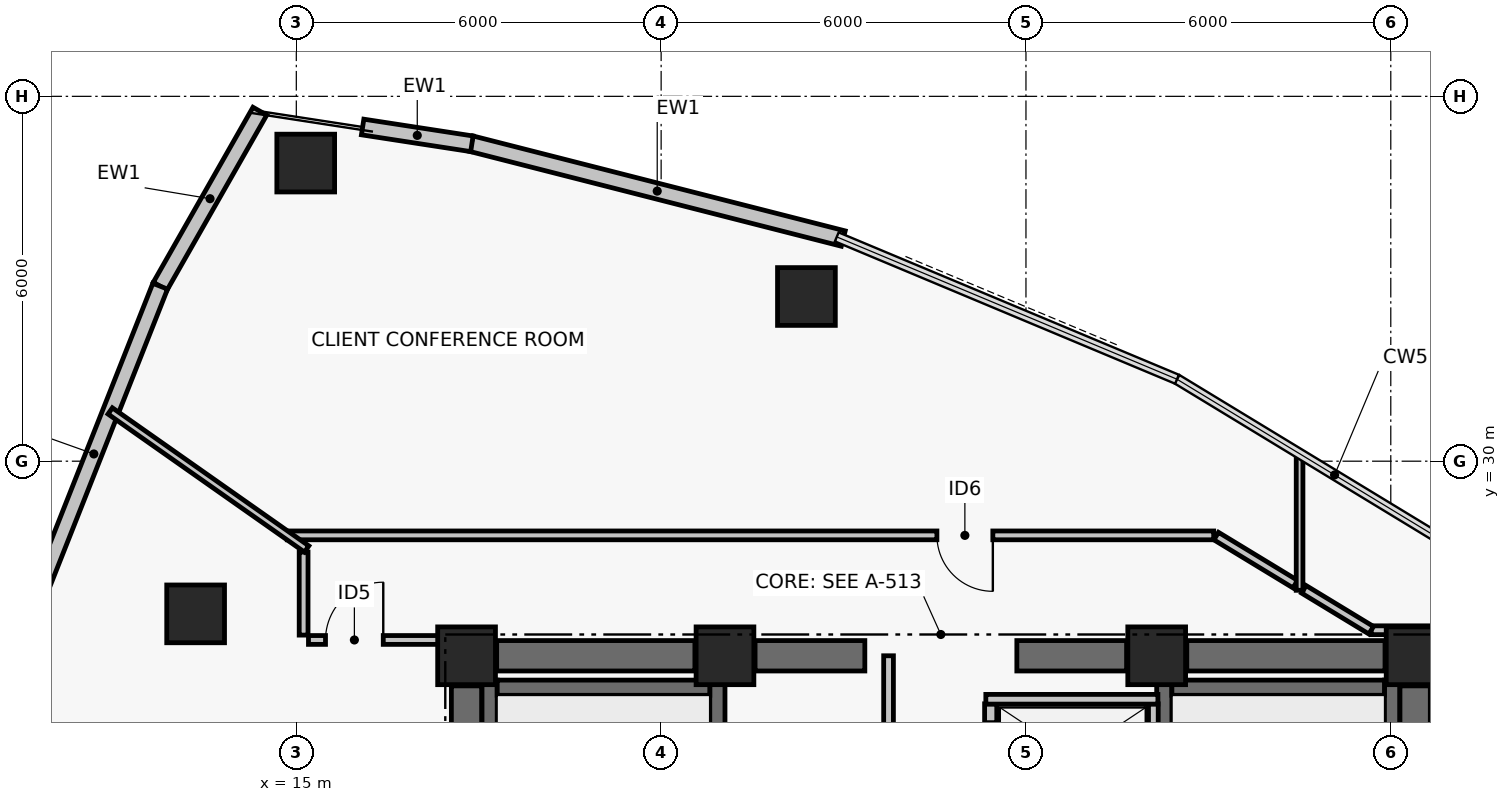
"""IFC4 building model, lengths in metres.
Left out: names, types, materials, properties, quantities, classifications, styles, units other than length and angle.
Written with IfcOpenShell. Run it as: python <this file> out.ifc"""

import sys

from ifc_helpers import new_model, si_unit, direction, frame, frame_2d, origin, origin_2d, place, context, subcontext, project, spatial, rectangle, hollow_rectangle, extrude, element, fill, save


model = new_model("IFC4")
c1 = context("Model", 3, precision=1e-05, world=origin(), true_north=direction((0.0, 1.0)))
c2 = subcontext(c1, "Body", "Model", "MODEL_VIEW")
j1 = project(units=[si_unit("LENGTHUNIT", "METRE"), si_unit("PLANEANGLEUNIT", "RADIAN")], contexts=[c1])
p1 = place(None, origin())
s1 = spatial("IfcSite", under=j1, at=p1, CompositionType="ELEMENT")
p2 = place(p1, origin())
s2 = spatial("IfcBuilding", under=s1, at=p2, CompositionType="ELEMENT")
p3 = place(p2, frame((0.0, 0.0, 176.64)))
s3 = spatial("IfcBuildingStorey", under=s2, at=p3, CompositionType="ELEMENT", Elevation=176.64)
for number, where, z_axis, x_axis in (
    (1, (17.8, 26.8, 0.0), (0.0, 0.0, 1.0), (1.0, 0.0, 0.0)),
    (2, (22.05, 26.8, 0.0), (0.0, 0.0, 1.0), (1.0, 0.0, 0.0)),
    (3, (29.15, 26.8, 0.0), (0.0, 0.0, 1.0), (1.0, 0.0, 0.0)),
    (4, (33.4, 26.8, 0.0), (0.0, 0.0, 1.0), (1.0, 0.0, 0.0)),
):
    element("IfcColumn", number, at=place(p3, frame(where, z_axis=z_axis, x_axis=x_axis)), inside=s3, PredefinedType="COLUMN", context=c2, shape_type="SweptSolid", body=[
        extrude(rectangle(XDim=0.95, YDim=0.95, at=origin_2d()), origin(), (0.0, 0.0, 1.0), 3.72),
    ])
p4 = place(p3, frame((18.295, 26.8, 0.0), z_axis=(0.0, 0.0, 1.0), x_axis=(1.0, 0.0, 0.0)))
e5 = element("IfcWall", 5, at=p4, inside=s3, PredefinedType="SHEAR", context=c2, shape_type="SweptSolid", body=[
    extrude(rectangle(XDim=3.26, YDim=0.5, at=frame_2d((1.63, 0.0))), origin(), (0.0, 0.0, 1.0), 3.5),
])
p5 = place(p3, frame((22.545, 26.8, 0.0), z_axis=(0.0, 0.0, 1.0), x_axis=(1.0, 0.0, 0.0)))
e6 = element("IfcWall", 6, at=p5, inside=s3, PredefinedType="SHEAR", context=c2, shape_type="SweptSolid", body=[
    extrude(rectangle(XDim=1.805, YDim=0.5, at=frame_2d((0.903, 0.0))), origin(), (0.0, 0.0, 1.0), 3.5),
])
p6 = place(p3, frame((26.85, 26.8, 0.0), z_axis=(0.0, 0.0, 1.0), x_axis=(1.0, 0.0, 0.0)))
e7 = element("IfcWall", 7, at=p6, inside=s3, PredefinedType="SHEAR", context=c2, shape_type="SweptSolid", body=[
    extrude(rectangle(XDim=1.805, YDim=0.5, at=frame_2d((0.902, 0.0))), origin(), (0.0, 0.0, 1.0), 3.5),
])
p7 = place(p3, frame((29.645, 26.8, 0.0), z_axis=(0.0, 0.0, 1.0), x_axis=(1.0, 0.0, 0.0)))
e8 = element("IfcWall", 8, at=p7, inside=s3, PredefinedType="SHEAR", context=c2, shape_type="SweptSolid", body=[
    extrude(rectangle(XDim=3.26, YDim=0.5, at=frame_2d((1.63, 0.0))), origin(), (0.0, 0.0, 1.0), 3.5),
])
for number, where, z_axis, x_axis in (
    (9, (17.8, 17.695, 0.0), (0.0, 0.0, 1.0), (0.0, 1.0, 0.0)),
    (10, (33.4, 17.695, 0.0), (0.0, 0.0, 1.0), (0.0, 1.0, 0.0)),
):
    element("IfcWall", number, at=place(p3, frame(where, z_axis=z_axis, x_axis=x_axis)), inside=s3, PredefinedType="SHEAR", context=c2, shape_type="SweptSolid", body=[
        extrude(rectangle(XDim=8.61, YDim=0.5, at=frame_2d((4.305, 0.0))), origin(), (0.0, 0.0, 1.0), 3.5),
    ])
p8 = place(p3, frame((18.179, 17.6, 0.0), z_axis=(0.0, 0.0, 1.0), x_axis=(0.0, 1.0, 0.0)))
e11 = element("IfcWall", 11, at=p8, inside=s3, PredefinedType="SHEAR", context=c2, shape_type="SweptSolid", body=[
    extrude(rectangle(XDim=8.8, YDim=0.25, at=frame_2d((4.4, 0.0))), origin(), (0.0, 0.0, 1.0), 3.5),
])
p9 = place(p3, frame((21.925, 17.6, 0.0), z_axis=(0.0, 0.0, 1.0), x_axis=(0.0, 1.0, 0.0)))
e12 = element("IfcWall", 12, at=p9, inside=s3, PredefinedType="SHEAR", context=c2, shape_type="SweptSolid", body=[
    extrude(rectangle(XDim=8.8, YDim=0.25, at=frame_2d((4.4, 0.0))), origin(), (0.0, 0.0, 1.0), 3.5),
])
p10 = place(p9, frame((0.35, 0.0, 0.0)))
e13 = element("IfcOpeningElement", 13, at=p10, cuts=e12, PredefinedType="OPENING", context=c2, shape_type="SweptSolid", body=[
    extrude(rectangle(XDim=1.05, YDim=2.08, at=frame_2d((0.525, 1.04))), frame((0.0, 0.135, 0.0), z_axis=(0.0, -1.0, 0.0), x_axis=(1.0, 0.0, 0.0)), (0.0, 0.0, 1.0), 0.27),
])
p11 = place(p3, frame((18.304, 26.275, 0.0), z_axis=(0.0, 0.0, 1.0), x_axis=(1.0, 0.0, 0.0)))
e14 = element("IfcWall", 14, at=p11, inside=s3, PredefinedType="SHEAR", context=c2, shape_type="SweptSolid", body=[
    extrude(rectangle(XDim=3.496, YDim=0.25, at=frame_2d((1.748, 0.0))), origin(), (0.0, 0.0, 1.0), 3.5),
])
p12 = place(p3, frame((29.275, 17.6, 0.0), z_axis=(0.0, 0.0, 1.0), x_axis=(0.0, 1.0, 0.0)))
e15 = element("IfcWall", 15, at=p12, inside=s3, PredefinedType="SHEAR", context=c2, shape_type="SweptSolid", body=[
    extrude(rectangle(XDim=8.8, YDim=0.25, at=frame_2d((4.4, 0.0))), origin(), (0.0, 0.0, 1.0), 3.5),
])
p13 = place(p12, frame((0.35, 0.0, 0.0)))
e16 = element("IfcOpeningElement", 16, at=p13, cuts=e15, PredefinedType="OPENING", context=c2, shape_type="SweptSolid", body=[
    extrude(rectangle(XDim=1.05, YDim=2.08, at=frame_2d((0.525, 1.04))), frame((0.0, 0.135, 0.0), z_axis=(0.0, -1.0, 0.0), x_axis=(1.0, 0.0, 0.0)), (0.0, 0.0, 1.0), 0.27),
])
p14 = place(p3, frame((33.021, 17.6, 0.0), z_axis=(0.0, 0.0, 1.0), x_axis=(0.0, 1.0, 0.0)))
e17 = element("IfcWall", 17, at=p14, inside=s3, PredefinedType="SHEAR", context=c2, shape_type="SweptSolid", body=[
    extrude(rectangle(XDim=8.8, YDim=0.25, at=frame_2d((4.4, 0.0))), origin(), (0.0, 0.0, 1.0), 3.5),
])
p15 = place(p3, frame((29.4, 26.275, 0.0), z_axis=(0.0, 0.0, 1.0), x_axis=(1.0, 0.0, 0.0)))
e18 = element("IfcWall", 18, at=p15, inside=s3, PredefinedType="SHEAR", context=c2, shape_type="SweptSolid", body=[
    extrude(rectangle(XDim=3.496, YDim=0.25, at=frame_2d((1.748, 0.0))), origin(), (0.0, 0.0, 1.0), 3.5),
])
for number, where, z_axis, x_axis in (
    (19, (23.389, 32.708, 0.0), (0.0, 0.0, 1.0), (1.0, 0.0, 0.0)),
    (20, (15.155, 34.903, 0.0), (0.0, 0.0, 1.0), (1.0, 0.0, 0.0)),
    (21, (13.344, 27.489, 0.0), (0.0, 0.0, 1.0), (1.0, 0.0, 0.0)),
):
    element("IfcColumn", number, at=place(p3, frame(where, z_axis=z_axis, x_axis=x_axis)), inside=s3, PredefinedType="COLUMN", context=c2, shape_type="SweptSolid", body=[
        extrude(hollow_rectangle(XDim=0.95, YDim=0.95, WallThickness=0.04, at=origin_2d()), origin(), (0.0, 0.0, 1.0), 3.72),
    ])
p16 = place(p3, frame((17.876, 35.222, 0.0), z_axis=(0.0, 0.0, 1.0), x_axis=(0.968976240439, -0.247153890246, 0.0)))
e22 = element("IfcWall", 22, at=p16, inside=s3, PredefinedType="PARTITIONING", context=c2, shape_type="SweptSolid", body=[
    extrude(rectangle(XDim=6.315, YDim=0.26, at=frame_2d((3.157, 0.0))), origin(), (0.0, 0.0, 1.0), 3.5),
])
p17 = place(p3, frame((16.091, 35.496, 0.0), z_axis=(0.0, 0.0, 1.0), x_axis=(0.988377906791, -0.15201681936, 0.0)))
e23 = element("IfcWall", 23, at=p17, inside=s3, PredefinedType="PARTITIONING", context=c2, shape_type="SweptSolid", body=[
    extrude(rectangle(XDim=1.818, YDim=0.26, at=frame_2d((0.909, 0.0))), origin(), (0.0, 0.0, 1.0), 3.5),
])
p18 = place(p3, frame((12.761, 32.878, 0.0), z_axis=(0.0, 0.0, 1.0), x_axis=(0.494884228667, 0.86895891745, 0.0)))
e24 = element("IfcWall", 24, at=p18, inside=s3, PredefinedType="PARTITIONING", context=c2, shape_type="SweptSolid", body=[
    extrude(rectangle(XDim=3.312, YDim=0.26, at=frame_2d((1.656, 0.0))), origin(), (0.0, 0.0, 1.0), 3.5),
])
p19 = place(p3, frame((10.579, 27.36, 0.0), z_axis=(0.0, 0.0, 1.0), x_axis=(0.367819433119, 0.929897233365, 0.0)))
e25 = element("IfcWall", 25, at=p19, inside=s3, PredefinedType="PARTITIONING", context=c2, shape_type="SweptSolid", body=[
    extrude(rectangle(XDim=5.933, YDim=0.26, at=frame_2d((2.967, 0.0))), origin(), (0.0, 0.0, 1.0), 3.5),
])
p20 = place(p3, frame((26.42, 24.29, 0.0), z_axis=(0.0, 0.0, 1.0), x_axis=(0.0, 1.0, 0.0)))
e26 = element("IfcWall", 26, at=p20, inside=s3, PredefinedType="PARTITIONING", context=c2, shape_type="SweptSolid", body=[
    extrude(rectangle(XDim=1.72, YDim=0.2, at=frame_2d((0.86, 0.0))), origin(), (0.0, 0.0, 1.0), 3.5),
])
p21 = place(p20, frame((0.31, 0.0, 0.0)))
e27 = element("IfcOpeningElement", 27, at=p21, cuts=e26, PredefinedType="OPENING", context=c2, shape_type="SweptSolid", body=[
    extrude(rectangle(XDim=1.1, YDim=2.08, at=frame_2d((0.55, 1.04))), frame((0.0, 0.11, 0.0), z_axis=(0.0, -1.0, 0.0), x_axis=(1.0, 0.0, 0.0)), (0.0, 0.0, 1.0), 0.22),
])
p22 = place(p3, frame((29.095, 20.56, 0.0), z_axis=(0.0, 0.0, 1.0), x_axis=(0.0, 1.0, 0.0)))
e28 = element("IfcWall", 28, at=p22, inside=s3, PredefinedType="PARTITIONING", context=c2, shape_type="SweptSolid", body=[
    extrude(rectangle(XDim=5.45, YDim=0.16, at=frame_2d((2.725, 0.0))), origin(), (0.0, 0.0, 1.0), 3.5),
])
p23 = place(p3, frame((26.34, 26.085, 0.0), z_axis=(0.0, 0.0, 1.0), x_axis=(1.0, 0.0, 0.0)))
e29 = element("IfcWall", 29, at=p23, inside=s3, PredefinedType="PARTITIONING", context=c2, shape_type="SweptSolid", body=[
    extrude(rectangle(XDim=2.83, YDim=0.16, at=frame_2d((1.415, 0.0))), origin(), (0.0, 0.0, 1.0), 3.5),
])
p24 = place(p3, frame((24.74, 22.43, 0.0), z_axis=(0.0, 0.0, 1.0), x_axis=(0.0, 1.0, 0.0)))
e30 = element("IfcWall", 30, at=p24, inside=s3, PredefinedType="PARTITIONING", context=c2, shape_type="SweptSolid", body=[
    extrude(rectangle(XDim=4.37, YDim=0.16, at=frame_2d((2.185, 0.0))), origin(), (0.0, 0.0, 1.0), 2.63),
])
p25 = place(p24, frame((1.4, 0.0, 0.0)))
e31 = element("IfcOpeningElement", 31, at=p25, cuts=e30, PredefinedType="OPENING", context=c2, shape_type="SweptSolid", body=[
    extrude(rectangle(XDim=0.98, YDim=2.06, at=frame_2d((0.49, 1.03))), frame((0.0, 0.09, 0.0), z_axis=(0.0, -1.0, 0.0), x_axis=(1.0, 0.0, 0.0)), (0.0, 0.0, 1.0), 0.18),
])
p26 = place(p3, frame((33.74, 27.22, 0.0), z_axis=(0.0, 0.0, 1.0), x_axis=(-1.0, 0.0, 0.0)))
e32 = element("IfcWall", 32, at=p26, inside=s3, PredefinedType="PARTITIONING", context=c2, shape_type="SweptSolid", body=[
    extrude(rectangle(XDim=1.062, YDim=0.145, at=frame_2d((0.531, 0.0))), origin(), (0.0, 0.0, 1.0), 2.63),
])
p27 = place(p3, frame((32.677, 27.22, 0.0), z_axis=(0.0, 0.0, 1.0), x_axis=(-0.854620308946, 0.51925343286, 0.0)))
e33 = element("IfcWall", 33, at=p27, inside=s3, PredefinedType="PARTITIONING", context=c2, shape_type="SweptSolid", body=[
    extrude(rectangle(XDim=1.296, YDim=0.145, at=frame_2d((0.648, 0.0))), origin(), (0.0, 0.0, 1.0), 2.63),
])
p28 = place(p3, frame((31.43, 27.978, 0.0), z_axis=(0.0, 0.0, 1.0), x_axis=(-0.854650301125, 0.519204066612, 0.0)))
e34 = element("IfcWall", 34, at=p28, inside=s3, PredefinedType="PARTITIONING", context=c2, shape_type="SweptSolid", body=[
    extrude(rectangle(XDim=1.522, YDim=0.145, at=frame_2d((0.761, 0.0))), origin(), (0.0, 0.0, 1.0), 2.93),
])
p29 = place(p3, frame((30.087, 28.78, 0.0), z_axis=(0.0, 0.0, 1.0), x_axis=(-1.0, 0.0, 0.0)))
e35 = element("IfcWall", 35, at=p29, inside=s3, PredefinedType="PARTITIONING", context=c2, shape_type="SweptSolid", body=[
    extrude(rectangle(XDim=15.236, YDim=0.145, at=frame_2d((7.618, 0.0))), origin(), (0.0, 0.0, 1.0), 2.73),
])
p30 = place(p29, frame((3.632, 0.0, 0.0)))
e36 = element("IfcOpeningElement", 36, at=p30, cuts=e35, PredefinedType="OPENING", context=c2, shape_type="SweptSolid", body=[
    extrude(rectangle(XDim=0.92, YDim=2.05, at=frame_2d((0.46, 1.025))), frame((0.0, 0.083, 0.0), z_axis=(0.0, -1.0, 0.0), x_axis=(1.0, 0.0, 0.0)), (0.0, 0.0, 1.0), 0.165),
])
p31 = place(p3, frame((15.12, 28.506, 0.0), z_axis=(0.0, 0.0, 1.0), x_axis=(0.0, -1.0, 0.0)))
e37 = element("IfcWall", 37, at=p31, inside=s3, PredefinedType="PARTITIONING", context=c2, shape_type="SweptSolid", body=[
    extrude(rectangle(XDim=1.366, YDim=0.145, at=frame_2d((0.683, 0.0))), origin(), (0.0, 0.0, 1.0), 2.73),
])
p32 = place(p3, frame((15.2, 27.06, 0.0), z_axis=(0.0, 0.0, 1.0), x_axis=(1.0, 0.0, 0.0)))
e38 = element("IfcWall", 38, at=p32, inside=s3, PredefinedType="PARTITIONING", context=c2, shape_type="SweptSolid", body=[
    extrude(rectangle(XDim=2.18, YDim=0.145, at=frame_2d((1.09, 0.0))), origin(), (0.0, 0.0, 1.0), 2.73),
])
p33 = place(p32, frame((0.28, 0.0, 0.0)))
e39 = element("IfcOpeningElement", 39, at=p33, cuts=e38, PredefinedType="OPENING", context=c2, shape_type="SweptSolid", body=[
    extrude(rectangle(XDim=0.95, YDim=2.06, at=frame_2d((0.475, 1.03))), frame((0.0, 0.083, 0.0), z_axis=(0.0, -1.0, 0.0), x_axis=(1.0, 0.0, 0.0)), (0.0, 0.0, 1.0), 0.165),
])
p34 = place(p3, frame((31.5, 27.877, 0.0), z_axis=(0.0, 0.0, 1.0), x_axis=(0.0, 1.0, 0.0)))
e40 = element("IfcWall", 40, at=p34, inside=s3, PredefinedType="PARTITIONING", context=c2, shape_type="SweptSolid", body=[
    extrude(rectangle(XDim=2.258, YDim=0.11, at=frame_2d((1.129, 0.0))), origin(), (0.0, 0.0, 1.0), 2.93),
])
p35 = place(p3, frame((11.939, 30.826, 0.0), z_axis=(0.0, 0.0, 1.0), x_axis=(0.81818776637, -0.574951110063, 0.0)))
e41 = element("IfcWall", 41, at=p35, inside=s3, PredefinedType="PARTITIONING", context=c2, shape_type="SweptSolid", body=[
    extrude(rectangle(XDim=3.949, YDim=0.125, at=frame_2d((1.974, 0.0))), origin(), (0.0, 0.0, 1.0), 2.93),
])
p36 = place(p30, origin())
e42 = element("IfcDoor", 42, at=p36, inside=s3, OperationType="SINGLE_SWING_LEFT", PredefinedType="DOOR", context=c2, shape_type="SweptSolid", body=[
    extrude(rectangle(XDim=0.92, YDim=2.05, at=frame_2d((0.46, 1.025))), frame((0.0, 0.025, 0.0), z_axis=(0.0, -1.0, 0.0), x_axis=(1.0, 0.0, 0.0)), (0.0, 0.0, 1.0), 0.05),
])
fill(e36, e42)
p37 = place(p33, origin())
e43 = element("IfcDoor", 43, at=p37, inside=s3, OperationType="SINGLE_SWING_RIGHT", PredefinedType="DOOR", context=c2, shape_type="SweptSolid", body=[
    extrude(rectangle(XDim=0.95, YDim=2.06, at=frame_2d((0.475, 1.03))), frame((0.0, 0.025, 0.0), z_axis=(0.0, -1.0, 0.0), x_axis=(1.0, 0.0, 0.0)), (0.0, 0.0, 1.0), 0.05),
])
fill(e39, e43)
save(model, sys.argv[1])
